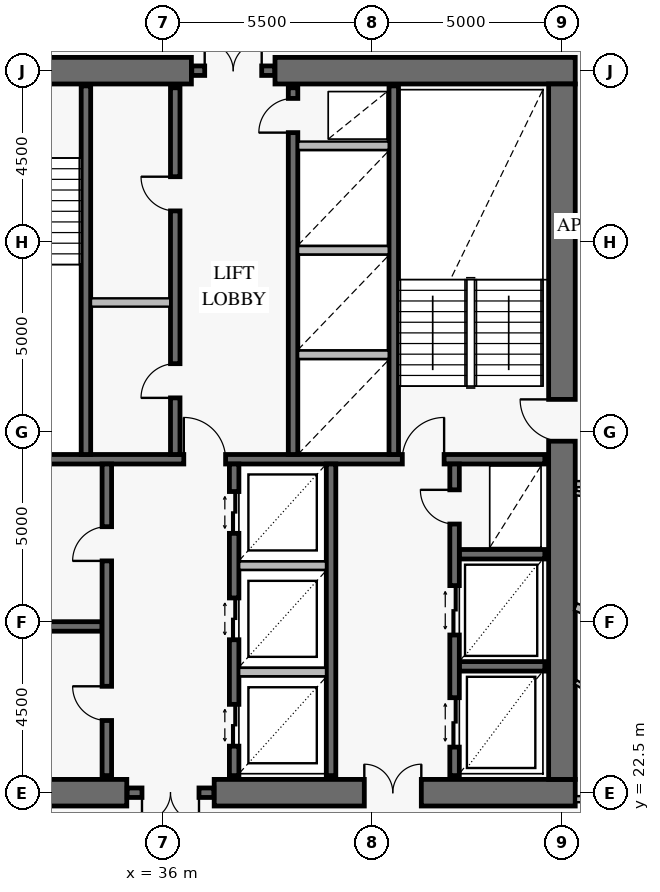
"""IFC4 building model, lengths in metres.
Left out: names, types, materials, properties, quantities, classifications, styles, units other than length and angle.
Written with IfcOpenShell. Run it as: python <this file> out.ifc"""

import sys

from ifc_helpers import new_model, si_unit, direction, frame, frame_2d, origin, place, context, subcontext, project, spatial, rectangle, extrude, element, fill, save


model = new_model("IFC4")
c1 = context("Model", 3, precision=1e-05, world=origin(), true_north=direction((0.0, 1.0)))
c2 = subcontext(c1, "Body", "Model", "MODEL_VIEW")
j1 = project(units=[si_unit("LENGTHUNIT", "METRE"), si_unit("PLANEANGLEUNIT", "RADIAN")], contexts=[c1])
p1 = place(None, origin())
s1 = spatial("IfcSite", under=j1, at=p1, CompositionType="ELEMENT")
p2 = place(p1, origin())
s2 = spatial("IfcBuilding", under=s1, at=p2, CompositionType="ELEMENT")
p3 = place(p2, frame((0.0, 0.0, 184.6)))
s3 = spatial("IfcBuildingStorey", under=s2, at=p3, CompositionType="ELEMENT", Elevation=184.6)
p4 = place(p3, frame((25.15, 22.5, 0.0), z_axis=(0.0, 0.0, 1.0), x_axis=(1.0, 0.0, 0.0)))
e1 = element("IfcWall", 1, at=p4, inside=s3, PredefinedType="SHEAR", context=c2, shape_type="SweptSolid", body=[
    extrude(rectangle(XDim=9.9, YDim=0.7, at=frame_2d((4.95, 0.0))), origin(), (0.0, 0.0, 1.0), 3.8),
])
p5 = place(p4, frame((4.25, 0.0, 0.0)))
e2 = element("IfcOpeningElement", 2, at=p5, cuts=e1, PredefinedType="OPENING", context=c2, shape_type="SweptSolid", body=[
    extrude(rectangle(XDim=1.5, YDim=2.15, at=frame_2d((0.75, 1.075))), frame((0.0, 0.362, 0.0), z_axis=(0.0, -1.0, 0.0), x_axis=(1.0, 0.0, 0.0)), (0.0, 0.0, 1.0), 0.724),
])
p6 = place(p3, frame((37.35, 22.5, 0.0), z_axis=(0.0, 0.0, 1.0), x_axis=(1.0, 0.0, 0.0)))
e3 = element("IfcWall", 3, at=p6, inside=s3, PredefinedType="SHEAR", context=c2, shape_type="SweptSolid", body=[
    extrude(rectangle(XDim=9.5, YDim=0.7, at=frame_2d((4.75, 0.0))), origin(), (0.0, 0.0, 1.0), 3.8),
])
p7 = place(p6, frame((3.95, 0.0, 0.0)))
e4 = element("IfcOpeningElement", 4, at=p7, cuts=e3, PredefinedType="OPENING", context=c2, shape_type="SweptSolid", body=[
    extrude(rectangle(XDim=1.5, YDim=2.15, at=frame_2d((0.75, 1.075))), frame((0.0, 0.362, 0.0), z_axis=(0.0, -1.0, 0.0), x_axis=(1.0, 0.0, 0.0)), (0.0, 0.0, 1.0), 0.724),
])
p8 = place(p3, frame((46.85, 41.5, 0.0), z_axis=(0.0, 0.0, 1.0), x_axis=(-1.0, 0.0, 0.0)))
e5 = element("IfcWall", 5, at=p8, inside=s3, PredefinedType="SHEAR", context=c2, shape_type="SweptSolid", body=[
    extrude(rectangle(XDim=7.9, YDim=0.7, at=frame_2d((3.95, 0.0))), origin(), (0.0, 0.0, 1.0), 3.8),
])
p9 = place(p3, frame((36.75, 41.5, 0.0), z_axis=(0.0, 0.0, 1.0), x_axis=(-1.0, 0.0, 0.0)))
e6 = element("IfcWall", 6, at=p9, inside=s3, PredefinedType="SHEAR", context=c2, shape_type="SweptSolid", body=[
    extrude(rectangle(XDim=11.6, YDim=0.7, at=frame_2d((5.8, 0.0))), origin(), (0.0, 0.0, 1.0), 3.8),
])
p10 = place(p9, frame((4.25, 0.0, 0.0)))
e7 = element("IfcOpeningElement", 7, at=p10, cuts=e6, PredefinedType="OPENING", context=c2, shape_type="SweptSolid", body=[
    extrude(rectangle(XDim=1.1, YDim=2.15, at=frame_2d((0.55, 1.075))), frame((0.0, 0.362, 0.0), z_axis=(0.0, -1.0, 0.0), x_axis=(1.0, 0.0, 0.0)), (0.0, 0.0, 1.0), 0.724),
])
p11 = place(p3, frame((46.5, 22.85, 0.0), z_axis=(0.0, 0.0, 1.0), x_axis=(0.0, 1.0, 0.0)))
e8 = element("IfcWall", 8, at=p11, inside=s3, PredefinedType="SHEAR", context=c2, shape_type="SweptSolid", body=[
    extrude(rectangle(XDim=18.3, YDim=0.7, at=frame_2d((9.15, 0.0))), origin(), (0.0, 0.0, 1.0), 3.8),
])
p12 = place(p11, frame((8.9, 0.0, 0.0)))
e9 = element("IfcOpeningElement", 9, at=p12, cuts=e8, PredefinedType="OPENING", context=c2, shape_type="SweptSolid", body=[
    extrude(rectangle(XDim=1.1, YDim=2.15, at=frame_2d((0.55, 1.075))), frame((0.0, 0.362, 0.0), z_axis=(0.0, -1.0, 0.0), x_axis=(1.0, 0.0, 0.0)), (0.0, 0.0, 1.0), 0.724),
])
p13 = place(p3, frame((35.06, 22.5, 0.0), z_axis=(0.0, 0.0, 1.0), x_axis=(1.0, 0.0, 0.0)))
e10 = element("IfcWall", 10, at=p13, inside=s3, PredefinedType="SOLIDWALL", context=c2, shape_type="SweptSolid", body=[
    extrude(rectangle(XDim=2.28, YDim=0.25, at=frame_2d((1.14, 0.0))), origin(), (0.0, 0.0, 1.0), 3.8),
])
p14 = place(p13, frame((0.39, 0.0, 0.0)))
e11 = element("IfcOpeningElement", 11, at=p14, cuts=e10, PredefinedType="OPENING", context=c2, shape_type="SweptSolid", body=[
    extrude(rectangle(XDim=1.5, YDim=2.15, at=frame_2d((0.75, 1.075))), frame((0.0, 0.137, 0.0), z_axis=(0.0, -1.0, 0.0), x_axis=(1.0, 0.0, 0.0)), (0.0, 0.0, 1.0), 0.274),
])
p15 = place(p3, frame((36.76, 41.5, 0.0), z_axis=(0.0, 0.0, 1.0), x_axis=(1.0, 0.0, 0.0)))
e12 = element("IfcWall", 12, at=p15, inside=s3, PredefinedType="SOLIDWALL", context=c2, shape_type="SweptSolid", body=[
    extrude(rectangle(XDim=2.18, YDim=0.25, at=frame_2d((1.09, 0.0))), origin(), (0.0, 0.0, 1.0), 3.8),
])
p16 = place(p15, frame((0.34, 0.0, 0.0)))
e13 = element("IfcOpeningElement", 13, at=p16, cuts=e12, PredefinedType="OPENING", context=c2, shape_type="SweptSolid", body=[
    extrude(rectangle(XDim=1.5, YDim=2.15, at=frame_2d((0.75, 1.075))), frame((0.0, 0.137, 0.0), z_axis=(0.0, -1.0, 0.0), x_axis=(1.0, 0.0, 0.0)), (0.0, 0.0, 1.0), 0.274),
])
p17 = place(p3, frame((25.95, 31.275, 0.0), z_axis=(0.0, 0.0, 1.0), x_axis=(1.0, 0.0, 0.0)))
e14 = element("IfcWall", 14, at=p17, inside=s3, PredefinedType="SOLIDWALL", context=c2, shape_type="SweptSolid", body=[
    extrude(rectangle(XDim=20.1, YDim=0.25, at=frame_2d((10.05, 0.0))), origin(), (0.0, 0.0, 1.0), 3.8),
])
p18 = place(p17, frame((2.6, 0.0, 0.0)))
e15 = element("IfcOpeningElement", 15, at=p18, cuts=e14, PredefinedType="OPENING", context=c2, shape_type="SweptSolid", body=[
    extrude(rectangle(XDim=1.1, YDim=2.15, at=frame_2d((0.55, 1.075))), frame((0.0, 0.137, 0.0), z_axis=(0.0, -1.0, 0.0), x_axis=(1.0, 0.0, 0.0)), (0.0, 0.0, 1.0), 0.274),
])
p19 = place(p17, frame((10.6, 0.0, 0.0)))
e16 = element("IfcOpeningElement", 16, at=p19, cuts=e14, PredefinedType="OPENING", context=c2, shape_type="SweptSolid", body=[
    extrude(rectangle(XDim=1.1, YDim=2.15, at=frame_2d((0.55, 1.075))), frame((0.0, 0.137, 0.0), z_axis=(0.0, -1.0, 0.0), x_axis=(1.0, 0.0, 0.0)), (0.0, 0.0, 1.0), 0.274),
])
p20 = place(p17, frame((16.35, 0.0, 0.0)))
e17 = element("IfcOpeningElement", 17, at=p20, cuts=e14, PredefinedType="OPENING", context=c2, shape_type="SweptSolid", body=[
    extrude(rectangle(XDim=1.1, YDim=2.15, at=frame_2d((0.55, 1.075))), frame((0.0, 0.137, 0.0), z_axis=(0.0, -1.0, 0.0), x_axis=(1.0, 0.0, 0.0)), (0.0, 0.0, 1.0), 0.274),
])
for number, where, z_axis, x_axis in (
    (18, (33.975, 31.4, 0.0), (0.0, 0.0, 1.0), (0.0, 1.0, 0.0)),
    (19, (42.075, 31.4, 0.0), (0.0, 0.0, 1.0), (0.0, 1.0, 0.0)),
):
    element("IfcWall", number, at=place(p3, frame(where, z_axis=z_axis, x_axis=x_axis)), inside=s3, PredefinedType="SOLIDWALL", context=c2, shape_type="SweptSolid", body=[
        extrude(rectangle(XDim=9.7, YDim=0.25, at=frame_2d((4.85, 0.0))), origin(), (0.0, 0.0, 1.0), 3.8),
    ])
p21 = place(p3, frame((36.325, 31.4, 0.0), z_axis=(0.0, 0.0, 1.0), x_axis=(0.0, 1.0, 0.0)))
e20 = element("IfcWall", 20, at=p21, inside=s3, PredefinedType="SOLIDWALL", context=c2, shape_type="SweptSolid", body=[
    extrude(rectangle(XDim=9.65, YDim=0.25, at=frame_2d((4.825, 0.0))), origin(), (0.0, 0.0, 1.0), 3.8),
])
p22 = place(p21, frame((1.49, 0.0, 0.0)))
e21 = element("IfcOpeningElement", 21, at=p22, cuts=e20, PredefinedType="OPENING", context=c2, shape_type="SweptSolid", body=[
    extrude(rectangle(XDim=0.9, YDim=2.1, at=frame_2d((0.45, 1.05))), frame((0.0, 0.137, 0.0), z_axis=(0.0, -1.0, 0.0), x_axis=(1.0, 0.0, 0.0)), (0.0, 0.0, 1.0), 0.274),
])
p23 = place(p21, frame((6.41, 0.0, 0.0)))
e22 = element("IfcOpeningElement", 22, at=p23, cuts=e20, PredefinedType="OPENING", context=c2, shape_type="SweptSolid", body=[
    extrude(rectangle(XDim=0.9, YDim=2.1, at=frame_2d((0.45, 1.05))), frame((0.0, 0.137, 0.0), z_axis=(0.0, -1.0, 0.0), x_axis=(1.0, 0.0, 0.0)), (0.0, 0.0, 1.0), 0.274),
])
p24 = place(p3, frame((39.425, 31.4, 0.0), z_axis=(0.0, 0.0, 1.0), x_axis=(0.0, 1.0, 0.0)))
e23 = element("IfcWall", 23, at=p24, inside=s3, PredefinedType="SOLIDWALL", context=c2, shape_type="SweptSolid", body=[
    extrude(rectangle(XDim=9.65, YDim=0.25, at=frame_2d((4.825, 0.0))), origin(), (0.0, 0.0, 1.0), 3.8),
])
p25 = place(p24, frame((8.47, 0.0, 0.0)))
e24 = element("IfcOpeningElement", 24, at=p25, cuts=e23, PredefinedType="OPENING", context=c2, shape_type="SweptSolid", body=[
    extrude(rectangle(XDim=0.9, YDim=2.1, at=frame_2d((0.45, 1.05))), frame((0.0, 0.137, 0.0), z_axis=(0.0, -1.0, 0.0), x_axis=(1.0, 0.0, 0.0)), (0.0, 0.0, 1.0), 0.274),
])
p26 = place(p3, frame((32.1, 26.875, 0.0), z_axis=(0.0, 0.0, 1.0), x_axis=(1.0, 0.0, 0.0)))
e25 = element("IfcWall", 25, at=p26, inside=s3, PredefinedType="SOLIDWALL", context=c2, shape_type="SweptSolid", body=[
    extrude(rectangle(XDim=2.3, YDim=0.25, at=frame_2d((1.15, 0.0))), origin(), (0.0, 0.0, 1.0), 3.8),
])
p27 = place(p3, frame((34.525, 22.95, 0.0), z_axis=(0.0, 0.0, 1.0), x_axis=(0.0, 1.0, 0.0)))
e26 = element("IfcWall", 26, at=p27, inside=s3, PredefinedType="SOLIDWALL", context=c2, shape_type="SweptSolid", body=[
    extrude(rectangle(XDim=8.2, YDim=0.25, at=frame_2d((4.1, 0.0))), origin(), (0.0, 0.0, 1.0), 3.8),
])
p28 = place(p27, frame((1.45, 0.0, 0.0)))
e27 = element("IfcOpeningElement", 27, at=p28, cuts=e26, PredefinedType="OPENING", context=c2, shape_type="SweptSolid", body=[
    extrude(rectangle(XDim=0.9, YDim=2.1, at=frame_2d((0.45, 1.05))), frame((0.0, 0.137, 0.0), z_axis=(0.0, -1.0, 0.0), x_axis=(1.0, 0.0, 0.0)), (0.0, 0.0, 1.0), 0.274),
])
p29 = place(p27, frame((5.65, 0.0, 0.0)))
e28 = element("IfcOpeningElement", 28, at=p29, cuts=e26, PredefinedType="OPENING", context=c2, shape_type="SweptSolid", body=[
    extrude(rectangle(XDim=0.9, YDim=2.1, at=frame_2d((0.45, 1.05))), frame((0.0, 0.137, 0.0), z_axis=(0.0, -1.0, 0.0), x_axis=(1.0, 0.0, 0.0)), (0.0, 0.0, 1.0), 0.274),
])
p30 = place(p3, frame((37.875, 22.95, 0.0), z_axis=(0.0, 0.0, 1.0), x_axis=(0.0, 1.0, 0.0)))
e29 = element("IfcWall", 29, at=p30, inside=s3, PredefinedType="SOLIDWALL", context=c2, shape_type="SweptSolid", body=[
    extrude(rectangle(XDim=8.2, YDim=0.25, at=frame_2d((4.1, 0.0))), origin(), (0.0, 0.0, 1.0), 3.8),
])
p31 = place(p30, frame((0.775, 0.0, 0.0)))
e30 = element("IfcOpeningElement", 30, at=p31, cuts=e29, PredefinedType="OPENING", context=c2, shape_type="SweptSolid", body=[
    extrude(rectangle(XDim=1.1, YDim=2.2, at=frame_2d((0.55, 1.1))), frame((0.0, 0.137, 0.0), z_axis=(0.0, -1.0, 0.0), x_axis=(1.0, 0.0, 0.0)), (0.0, 0.0, 1.0), 0.274),
])
p32 = place(p30, frame((3.575, 0.0, 0.0)))
e31 = element("IfcOpeningElement", 31, at=p32, cuts=e29, PredefinedType="OPENING", context=c2, shape_type="SweptSolid", body=[
    extrude(rectangle(XDim=1.1, YDim=2.2, at=frame_2d((0.55, 1.1))), frame((0.0, 0.137, 0.0), z_axis=(0.0, -1.0, 0.0), x_axis=(1.0, 0.0, 0.0)), (0.0, 0.0, 1.0), 0.274),
])
p33 = place(p30, frame((6.375, 0.0, 0.0)))
e32 = element("IfcOpeningElement", 32, at=p33, cuts=e29, PredefinedType="OPENING", context=c2, shape_type="SweptSolid", body=[
    extrude(rectangle(XDim=1.1, YDim=2.2, at=frame_2d((0.55, 1.1))), frame((0.0, 0.137, 0.0), z_axis=(0.0, -1.0, 0.0), x_axis=(1.0, 0.0, 0.0)), (0.0, 0.0, 1.0), 0.274),
])
p34 = place(p3, frame((40.425, 22.95, 0.0), z_axis=(0.0, 0.0, 1.0), x_axis=(0.0, 1.0, 0.0)))
e33 = element("IfcWall", 33, at=p34, inside=s3, PredefinedType="SOLIDWALL", context=c2, shape_type="SweptSolid", body=[
    extrude(rectangle(XDim=8.2, YDim=0.25, at=frame_2d((4.1, 0.0))), origin(), (0.0, 0.0, 1.0), 3.8),
])
for number, where, z_axis, x_axis in (
    (34, (43.8, 25.825, 0.0), (0.0, 0.0, 1.0), (1.0, 0.0, 0.0)),
    (35, (43.8, 28.775, 0.0), (0.0, 0.0, 1.0), (1.0, 0.0, 0.0)),
):
    element("IfcWall", number, at=place(p3, frame(where, z_axis=z_axis, x_axis=x_axis)), inside=s3, PredefinedType="SOLIDWALL", context=c2, shape_type="SweptSolid", body=[
        extrude(rectangle(XDim=2.25, YDim=0.25, at=frame_2d((1.125, 0.0))), origin(), (0.0, 0.0, 1.0), 3.8),
    ])
p35 = place(p3, frame((43.675, 22.95, 0.0), z_axis=(0.0, 0.0, 1.0), x_axis=(0.0, 1.0, 0.0)))
e36 = element("IfcWall", 36, at=p35, inside=s3, PredefinedType="SOLIDWALL", context=c2, shape_type="SweptSolid", body=[
    extrude(rectangle(XDim=8.2, YDim=0.25, at=frame_2d((4.1, 0.0))), origin(), (0.0, 0.0, 1.0), 3.8),
])
p36 = place(p35, frame((0.75, 0.0, 0.0)))
e37 = element("IfcOpeningElement", 37, at=p36, cuts=e36, PredefinedType="OPENING", context=c2, shape_type="SweptSolid", body=[
    extrude(rectangle(XDim=1.3, YDim=2.3, at=frame_2d((0.65, 1.15))), frame((0.0, 0.137, 0.0), z_axis=(0.0, -1.0, 0.0), x_axis=(1.0, 0.0, 0.0)), (0.0, 0.0, 1.0), 0.274),
])
p37 = place(p35, frame((3.7, 0.0, 0.0)))
e38 = element("IfcOpeningElement", 38, at=p37, cuts=e36, PredefinedType="OPENING", context=c2, shape_type="SweptSolid", body=[
    extrude(rectangle(XDim=1.3, YDim=2.3, at=frame_2d((0.65, 1.15))), frame((0.0, 0.137, 0.0), z_axis=(0.0, -1.0, 0.0), x_axis=(1.0, 0.0, 0.0)), (0.0, 0.0, 1.0), 0.274),
])
p38 = place(p35, frame((6.62, 0.0, 0.0)))
e39 = element("IfcOpeningElement", 39, at=p38, cuts=e36, PredefinedType="OPENING", context=c2, shape_type="SweptSolid", body=[
    extrude(rectangle(XDim=0.9, YDim=2.1, at=frame_2d((0.45, 1.05))), frame((0.0, 0.137, 0.0), z_axis=(0.0, -1.0, 0.0), x_axis=(1.0, 0.0, 0.0)), (0.0, 0.0, 1.0), 0.274),
])
p39 = place(p3, frame((34.108, 35.4, 0.0), z_axis=(0.0, 0.0, 1.0), x_axis=(1.0, 0.0, 0.0)))
e40 = element("IfcWall", 40, at=p39, inside=s3, PredefinedType="PARTITIONING", context=c2, shape_type="SweptSolid", body=[
    extrude(rectangle(XDim=2.084, YDim=0.22, at=frame_2d((1.042, 0.0))), origin(), (0.0, 0.0, 1.0), 3.55),
])
for number, where, z_axis, x_axis in (
    (41, (39.558, 34.025, 0.0), (0.0, 0.0, 1.0), (1.0, 0.0, 0.0)),
    (42, (39.558, 36.775, 0.0), (0.0, 0.0, 1.0), (1.0, 0.0, 0.0)),
    (43, (39.558, 39.525, 0.0), (0.0, 0.0, 1.0), (1.0, 0.0, 0.0)),
):
    element("IfcWall", number, at=place(p3, frame(where, z_axis=z_axis, x_axis=x_axis)), inside=s3, PredefinedType="PARTITIONING", context=c2, shape_type="SweptSolid", body=[
        extrude(rectangle(XDim=2.384, YDim=0.22, at=frame_2d((1.192, 0.0))), origin(), (0.0, 0.0, 1.0), 3.55),
    ])
for number, where, z_axis, x_axis in (
    (44, (38.008, 25.675, 0.0), (0.0, 0.0, 1.0), (1.0, 0.0, 0.0)),
    (45, (38.008, 28.475, 0.0), (0.0, 0.0, 1.0), (1.0, 0.0, 0.0)),
):
    element("IfcWall", number, at=place(p3, frame(where, z_axis=z_axis, x_axis=x_axis)), inside=s3, PredefinedType="PARTITIONING", context=c2, shape_type="SweptSolid", body=[
        extrude(rectangle(XDim=2.284, YDim=0.22, at=frame_2d((1.142, 0.0))), origin(), (0.0, 0.0, 1.0), 3.55),
    ])
p40 = place(p3, frame((46.858, 25.411, 0.0), z_axis=(0.0, 0.0, 1.0), x_axis=(0.854916867304, -0.518765023878, 0.0)))
e46 = element("IfcWall", 46, at=p40, inside=s3, PredefinedType="PARTITIONING", context=c2, shape_type="SweptSolid", body=[
    extrude(rectangle(XDim=8.909, YDim=0.12, at=frame_2d((4.455, 0.0))), origin(), (0.0, 0.0, 1.0), 3.15),
])
p41 = place(p3, frame((46.858, 27.391, 0.0), z_axis=(0.0, 0.0, 1.0), x_axis=(0.920508238271, -0.390723154261, 0.0)))
e47 = element("IfcWall", 47, at=p41, inside=s3, PredefinedType="PARTITIONING", context=c2, shape_type="SweptSolid", body=[
    extrude(rectangle(XDim=15.592, YDim=0.2, at=frame_2d((7.796, 0.0))), origin(), (0.0, 0.0, 1.0), 2.87),
])
p42 = place(p3, frame((46.858, 30.389, 0.0), z_axis=(0.0, 0.0, 1.0), x_axis=(0.989161931015, -0.146828724135, 0.0)))
e48 = element("IfcWall", 48, at=p42, inside=s3, PredefinedType="PARTITIONING", context=c2, shape_type="SweptSolid", body=[
    extrude(rectangle(XDim=2.211, YDim=0.12, at=frame_2d((1.106, 0.0))), origin(), (0.0, 0.0, 1.0), 3.55),
])
p43 = place(p3, frame((51.65, 22.33, 0.0), z_axis=(0.0, 0.0, 1.0), x_axis=(-1.0, 0.0, 0.0)))
e49 = element("IfcWall", 49, at=p43, inside=s3, PredefinedType="PARTITIONING", context=c2, shape_type="SweptSolid", body=[
    extrude(rectangle(XDim=4.78, YDim=0.16, at=frame_2d((2.39, 0.0))), origin(), (0.0, 0.0, 1.0), 3.55),
])
p44 = place(p3, frame((46.87, 30.62, 0.0), z_axis=(0.0, 0.0, 1.0), x_axis=(1.0, 0.0, 0.0)))
e50 = element("IfcWall", 50, at=p44, inside=s3, PredefinedType="PARTITIONING", context=c2, shape_type="SweptSolid", body=[
    extrude(rectangle(XDim=2.03, YDim=0.16, at=frame_2d((1.015, 0.0))), origin(), (0.0, 0.0, 1.0), 3.55),
])
p45 = place(p12, origin())
e51 = element("IfcDoor", 51, at=p45, inside=s3, OperationType="SINGLE_SWING_RIGHT", PredefinedType="USERDEFINED", context=c2, shape_type="SweptSolid", body=[
    extrude(rectangle(XDim=1.1, YDim=2.15, at=frame_2d((0.55, 1.075))), frame((0.0, 0.025, 0.0), z_axis=(0.0, -1.0, 0.0), x_axis=(1.0, 0.0, 0.0)), (0.0, 0.0, 1.0), 0.05),
])
fill(e9, e51)
p46 = place(p7, origin())
e52 = element("IfcDoor", 52, at=p46, inside=s3, OperationType="DOUBLE_DOOR_SINGLE_SWING", PredefinedType="DOOR", context=c2, shape_type="SweptSolid", body=[
    extrude(rectangle(XDim=1.5, YDim=2.15, at=frame_2d((0.75, 1.075))), frame((0.0, 0.025, 0.0), z_axis=(0.0, -1.0, 0.0), x_axis=(1.0, 0.0, 0.0)), (0.0, 0.0, 1.0), 0.05),
])
fill(e4, e52)
p47 = place(p14, frame((1.5, 0.0, 0.0), z_axis=(0.0, 0.0, 1.0), x_axis=(-1.0, 0.0, 0.0)))
e53 = element("IfcDoor", 53, at=p47, inside=s3, OperationType="DOUBLE_DOOR_SINGLE_SWING", PredefinedType="DOOR", context=c2, shape_type="SweptSolid", body=[
    extrude(rectangle(XDim=1.5, YDim=2.15, at=frame_2d((0.75, 1.075))), frame((0.0, 0.025, 0.0), z_axis=(0.0, -1.0, 0.0), x_axis=(1.0, 0.0, 0.0)), (0.0, 0.0, 1.0), 0.05),
])
fill(e11, e53)
p48 = place(p16, origin())
e54 = element("IfcDoor", 54, at=p48, inside=s3, OperationType="DOUBLE_DOOR_SINGLE_SWING", PredefinedType="DOOR", context=c2, shape_type="SweptSolid", body=[
    extrude(rectangle(XDim=1.5, YDim=2.15, at=frame_2d((0.75, 1.075))), frame((0.0, 0.025, 0.0), z_axis=(0.0, -1.0, 0.0), x_axis=(1.0, 0.0, 0.0)), (0.0, 0.0, 1.0), 0.05),
])
fill(e13, e54)
p49 = place(p19, origin())
e55 = element("IfcDoor", 55, at=p49, inside=s3, OperationType="SINGLE_SWING_LEFT", PredefinedType="USERDEFINED", context=c2, shape_type="SweptSolid", body=[
    extrude(rectangle(XDim=1.1, YDim=2.15, at=frame_2d((0.55, 1.075))), frame((0.0, 0.025, 0.0), z_axis=(0.0, -1.0, 0.0), x_axis=(1.0, 0.0, 0.0)), (0.0, 0.0, 1.0), 0.05),
])
fill(e16, e55)
p50 = place(p20, origin())
e56 = element("IfcDoor", 56, at=p50, inside=s3, OperationType="SINGLE_SWING_RIGHT", PredefinedType="USERDEFINED", context=c2, shape_type="SweptSolid", body=[
    extrude(rectangle(XDim=1.1, YDim=2.15, at=frame_2d((0.55, 1.075))), frame((0.0, 0.025, 0.0), z_axis=(0.0, -1.0, 0.0), x_axis=(1.0, 0.0, 0.0)), (0.0, 0.0, 1.0), 0.05),
])
fill(e17, e56)
p51 = place(p22, origin())
e57 = element("IfcDoor", 57, at=p51, inside=s3, OperationType="SINGLE_SWING_LEFT", PredefinedType="DOOR", context=c2, shape_type="SweptSolid", body=[
    extrude(rectangle(XDim=0.9, YDim=2.1, at=frame_2d((0.45, 1.05))), frame((0.0, 0.025, 0.0), z_axis=(0.0, -1.0, 0.0), x_axis=(1.0, 0.0, 0.0)), (0.0, 0.0, 1.0), 0.05),
])
fill(e21, e57)
p52 = place(p23, origin())
e58 = element("IfcDoor", 58, at=p52, inside=s3, OperationType="SINGLE_SWING_RIGHT", PredefinedType="DOOR", context=c2, shape_type="SweptSolid", body=[
    extrude(rectangle(XDim=0.9, YDim=2.1, at=frame_2d((0.45, 1.05))), frame((0.0, 0.025, 0.0), z_axis=(0.0, -1.0, 0.0), x_axis=(1.0, 0.0, 0.0)), (0.0, 0.0, 1.0), 0.05),
])
fill(e22, e58)
p53 = place(p25, origin())
e59 = element("IfcDoor", 59, at=p53, inside=s3, OperationType="SINGLE_SWING_LEFT", PredefinedType="DOOR", context=c2, shape_type="SweptSolid", body=[
    extrude(rectangle(XDim=0.9, YDim=2.1, at=frame_2d((0.45, 1.05))), frame((0.0, 0.025, 0.0), z_axis=(0.0, -1.0, 0.0), x_axis=(1.0, 0.0, 0.0)), (0.0, 0.0, 1.0), 0.05),
])
fill(e24, e59)
p54 = place(p28, origin())
e60 = element("IfcDoor", 60, at=p54, inside=s3, OperationType="SINGLE_SWING_RIGHT", PredefinedType="DOOR", context=c2, shape_type="SweptSolid", body=[
    extrude(rectangle(XDim=0.9, YDim=2.1, at=frame_2d((0.45, 1.05))), frame((0.0, 0.025, 0.0), z_axis=(0.0, -1.0, 0.0), x_axis=(1.0, 0.0, 0.0)), (0.0, 0.0, 1.0), 0.05),
])
fill(e27, e60)
p55 = place(p29, origin())
e61 = element("IfcDoor", 61, at=p55, inside=s3, OperationType="SINGLE_SWING_LEFT", PredefinedType="DOOR", context=c2, shape_type="SweptSolid", body=[
    extrude(rectangle(XDim=0.9, YDim=2.1, at=frame_2d((0.45, 1.05))), frame((0.0, 0.025, 0.0), z_axis=(0.0, -1.0, 0.0), x_axis=(1.0, 0.0, 0.0)), (0.0, 0.0, 1.0), 0.05),
])
fill(e28, e61)
p56 = place(p31, origin())
e62 = element("IfcDoor", 62, at=p56, inside=s3, OperationType="DOUBLE_DOOR_SLIDING", PredefinedType="DOOR", context=c2, shape_type="SweptSolid", body=[
    extrude(rectangle(XDim=1.1, YDim=2.2, at=frame_2d((0.55, 1.1))), frame((0.0, 0.025, 0.0), z_axis=(0.0, -1.0, 0.0), x_axis=(1.0, 0.0, 0.0)), (0.0, 0.0, 1.0), 0.05),
])
fill(e30, e62)
p57 = place(p32, origin())
e63 = element("IfcDoor", 63, at=p57, inside=s3, OperationType="DOUBLE_DOOR_SLIDING", PredefinedType="DOOR", context=c2, shape_type="SweptSolid", body=[
    extrude(rectangle(XDim=1.1, YDim=2.2, at=frame_2d((0.55, 1.1))), frame((0.0, 0.025, 0.0), z_axis=(0.0, -1.0, 0.0), x_axis=(1.0, 0.0, 0.0)), (0.0, 0.0, 1.0), 0.05),
])
fill(e31, e63)
p58 = place(p33, origin())
e64 = element("IfcDoor", 64, at=p58, inside=s3, OperationType="DOUBLE_DOOR_SLIDING", PredefinedType="DOOR", context=c2, shape_type="SweptSolid", body=[
    extrude(rectangle(XDim=1.1, YDim=2.2, at=frame_2d((0.55, 1.1))), frame((0.0, 0.025, 0.0), z_axis=(0.0, -1.0, 0.0), x_axis=(1.0, 0.0, 0.0)), (0.0, 0.0, 1.0), 0.05),
])
fill(e32, e64)
p59 = place(p36, origin())
e65 = element("IfcDoor", 65, at=p59, inside=s3, OperationType="DOUBLE_DOOR_SLIDING", PredefinedType="DOOR", context=c2, shape_type="SweptSolid", body=[
    extrude(rectangle(XDim=1.3, YDim=2.3, at=frame_2d((0.65, 1.15))), frame((0.0, 0.025, 0.0), z_axis=(0.0, -1.0, 0.0), x_axis=(1.0, 0.0, 0.0)), (0.0, 0.0, 1.0), 0.05),
])
fill(e37, e65)
p60 = place(p37, origin())
e66 = element("IfcDoor", 66, at=p60, inside=s3, OperationType="DOUBLE_DOOR_SLIDING", PredefinedType="DOOR", context=c2, shape_type="SweptSolid", body=[
    extrude(rectangle(XDim=1.3, YDim=2.3, at=frame_2d((0.65, 1.15))), frame((0.0, 0.025, 0.0), z_axis=(0.0, -1.0, 0.0), x_axis=(1.0, 0.0, 0.0)), (0.0, 0.0, 1.0), 0.05),
])
fill(e38, e66)
p61 = place(p38, origin())
e67 = element("IfcDoor", 67, at=p61, inside=s3, OperationType="SINGLE_SWING_RIGHT", PredefinedType="DOOR", context=c2, shape_type="SweptSolid", body=[
    extrude(rectangle(XDim=0.9, YDim=2.1, at=frame_2d((0.45, 1.05))), frame((0.0, 0.025, 0.0), z_axis=(0.0, -1.0, 0.0), x_axis=(1.0, 0.0, 0.0)), (0.0, 0.0, 1.0), 0.05),
])
fill(e39, e67)
save(model, sys.argv[1])
